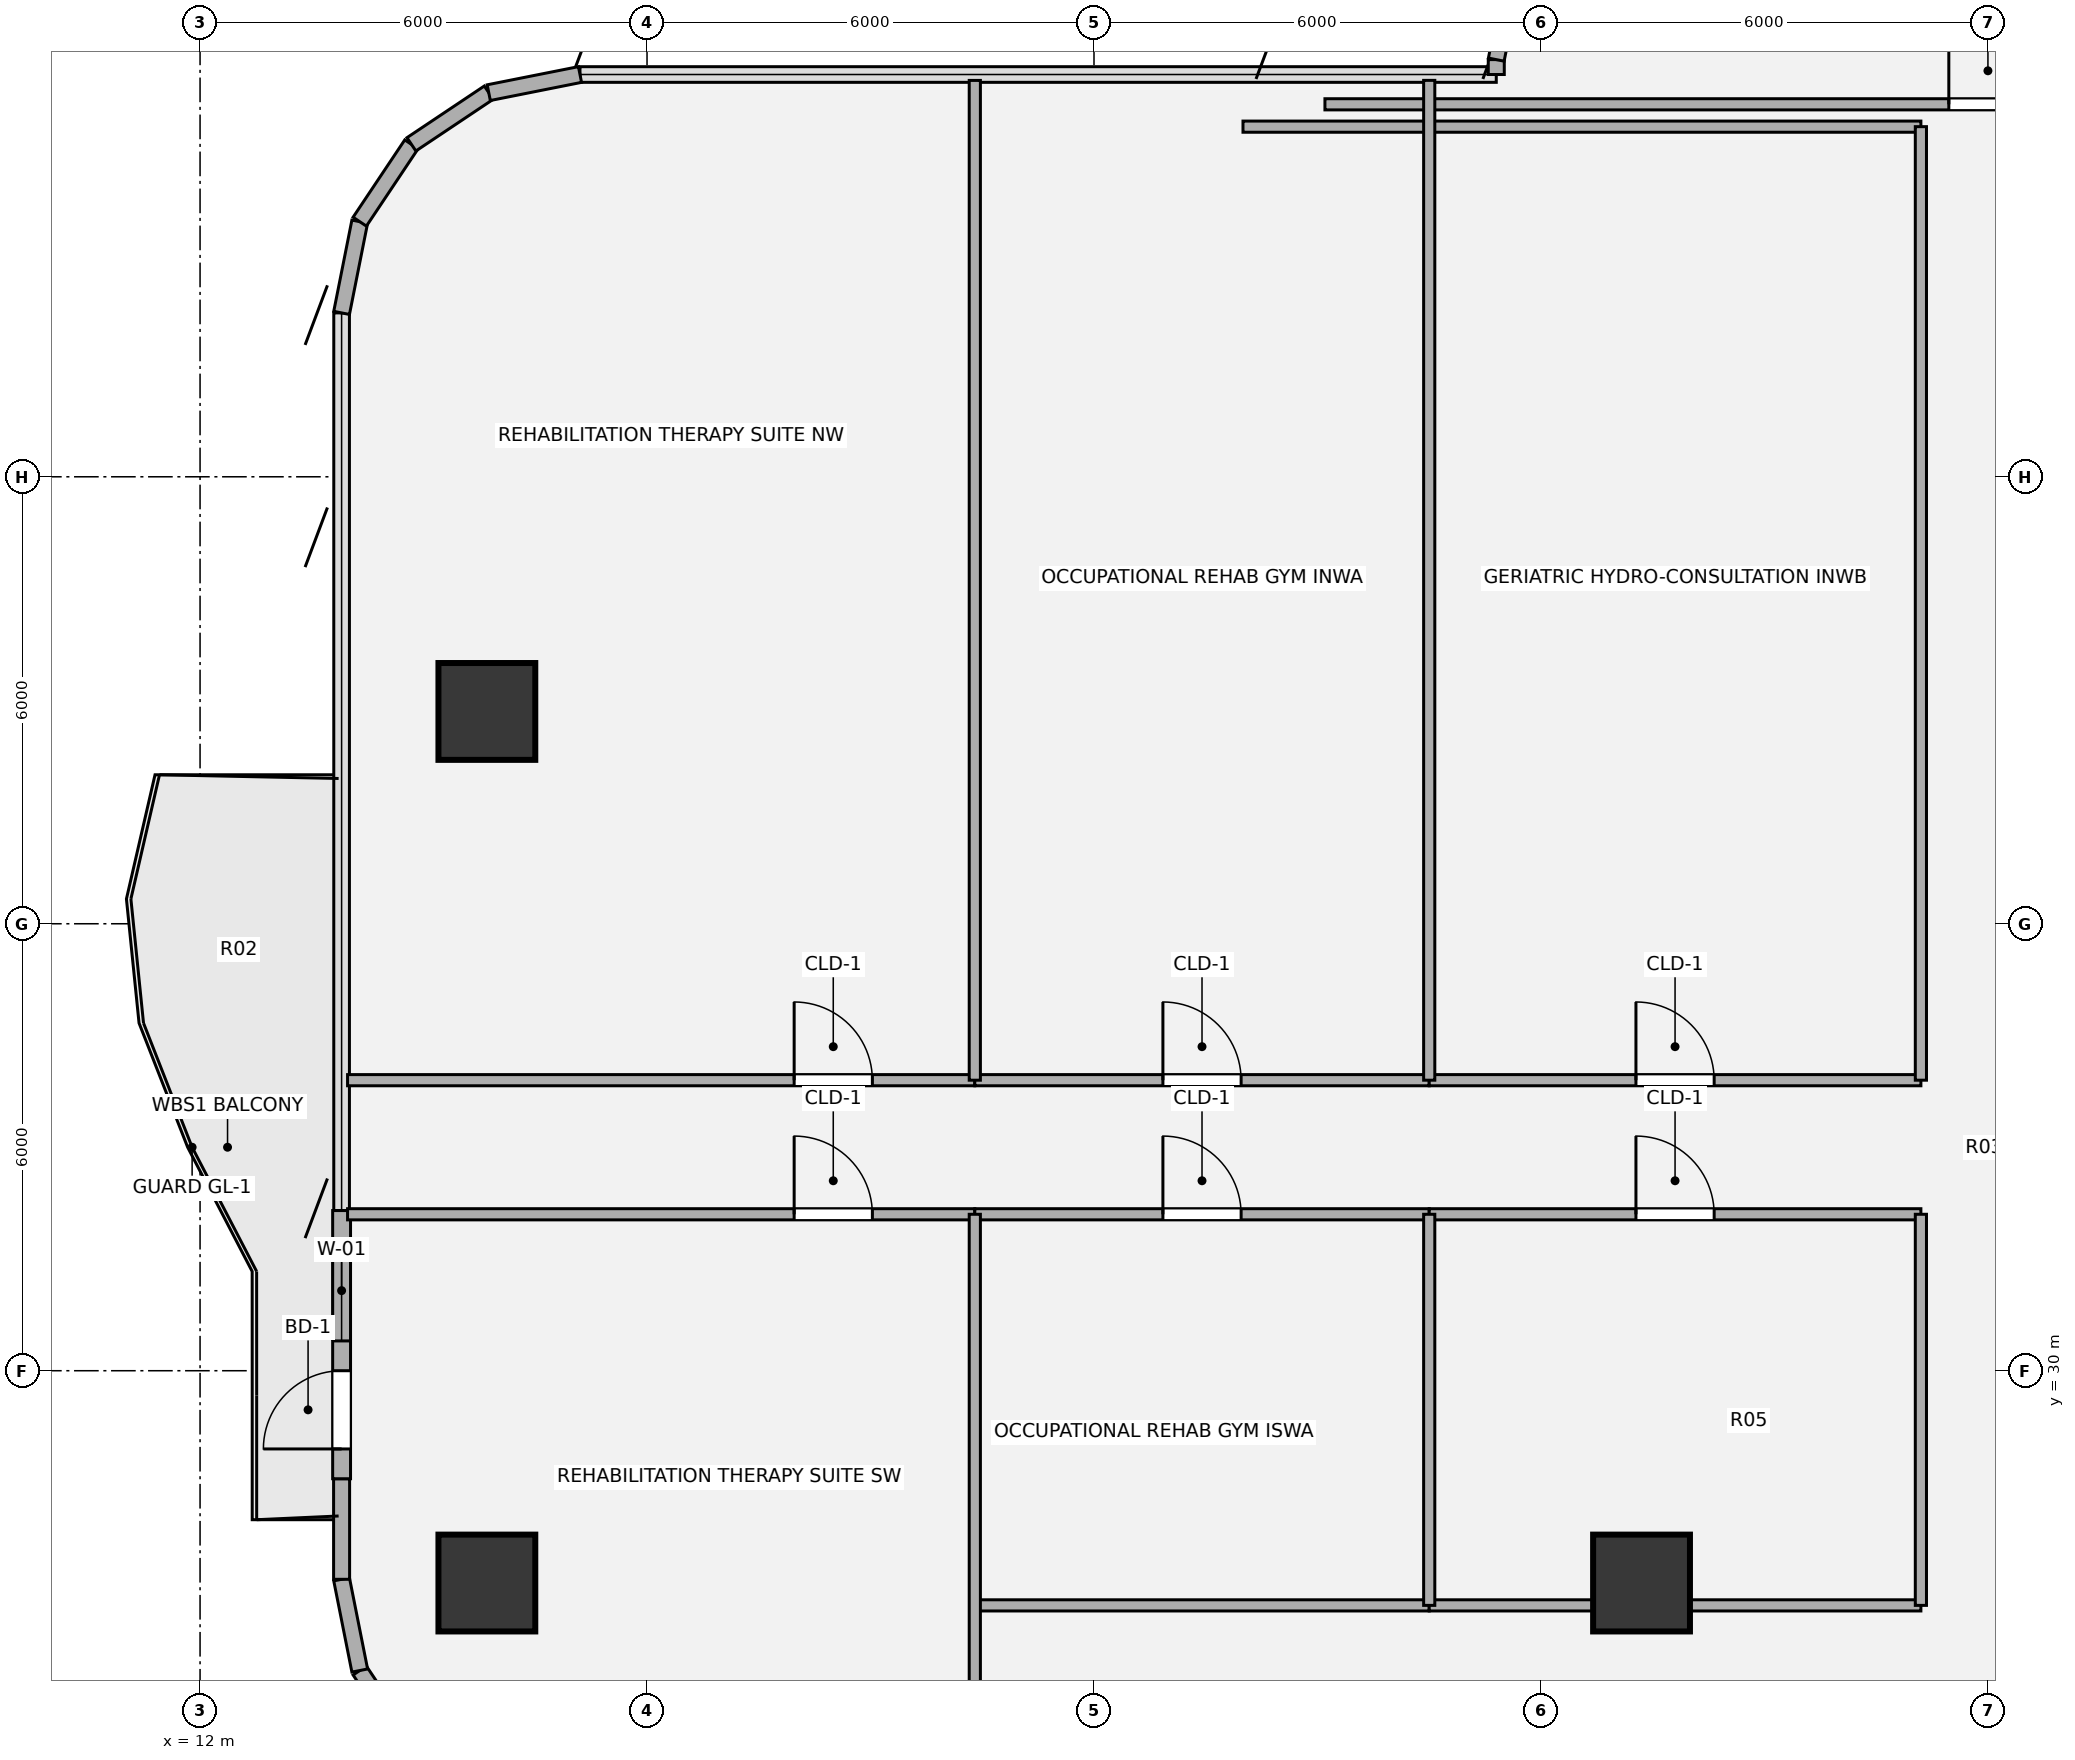
"""IFC4 building model, lengths in metres.
Left out: names, types, materials, properties, quantities, classifications, styles, units other than length and angle.
Written with IfcOpenShell. Run it as: python <this file> out.ifc"""

import sys

from ifc_helpers import new_model, si_unit, direction, frame, frame_2d, origin, origin_2d, place, context, subcontext, project, spatial, rectangle, hollow_circle, extrude, source, transform, mapped, element, fill, save


model = new_model("IFC4")
c1 = context("Model", 3, precision=1e-05, world=origin(), true_north=direction((0.0, 1.0)))
c2 = subcontext(c1, "Body", "Model", "MODEL_VIEW")
j1 = project(units=[si_unit("LENGTHUNIT", "METRE"), si_unit("PLANEANGLEUNIT", "RADIAN")], contexts=[c1])
p1 = place(None, origin())
s1 = spatial("IfcSite", under=j1, at=p1, CompositionType="ELEMENT")
p2 = place(p1, origin())
s2 = spatial("IfcBuilding", under=s1, at=p2, CompositionType="ELEMENT")
p3 = place(p2, frame((0.0, 0.0, 112.5)))
s3 = spatial("IfcBuildingStorey", under=s2, at=p3, CompositionType="ELEMENT", Elevation=112.5)
m1 = source(origin(), c2, "Body", "SweptSolid", [
    extrude(hollow_circle(Radius=0.65, WallThickness=0.045, at=origin_2d()), origin(), (0.0, 0.0, 1.0), 3.78),
])
for number, where, z_axis, x_axis in (
    (1, (15.85, 27.15, 0.0), (0.0, 0.0, 1.0), (1.0, 0.0, 0.0)),
    (2, (15.85, 38.85, 0.0), (0.0, 0.0, 1.0), (1.0, 0.0, 0.0)),
    (3, (31.35, 27.15, 0.0), (0.0, 0.0, 1.0), (1.0, 0.0, 0.0)),
):
    element("IfcColumn", number, at=place(p3, frame(where, z_axis=z_axis, x_axis=x_axis)), inside=s3, PredefinedType="COLUMN", context=c2, shape_type="MappedRepresentation", body=[
        mapped(m1, transform((0.0, 0.0, 0.0), x_axis=(1.0, 0.0, 0.0), y_axis=(0.0, 1.0, 0.0), z_axis=(0.0, 0.0, 1.0), scale=1.0)),
    ])
for number, where, z_axis, x_axis in (
    (4, (14.837, 24.937, 0.0), (0.0, 0.0, 1.0), (-0.556, 0.831, 0.0)),
    (5, (14.144, 25.975, 0.0), (0.0, 0.0, 1.0), (-0.195, 0.981, 0.0)),
):
    element("IfcWall", number, at=place(p3, frame(where, z_axis=z_axis, x_axis=x_axis)), inside=s3, PredefinedType="SOLIDWALL", context=c2, shape_type="SweptSolid", body=[
        extrude(rectangle(XDim=1.249, YDim=0.215, at=frame_2d((0.624, 0.0))), origin(), (0.0, 0.0, 1.0), 3.53),
    ])
p4 = place(p3, frame((13.9, 27.2, 0.0), z_axis=(0.0, 0.0, 1.0), x_axis=(0.0, 1.0, 0.0)))
e6 = element("IfcWall", 6, at=p4, inside=s3, PredefinedType="SOLIDWALL", context=c2, shape_type="SweptSolid", body=[
    extrude(rectangle(XDim=1.35, YDim=0.215, at=frame_2d((0.675, 0.0))), origin(), (0.0, 0.0, 1.0), 3.53),
])
p5 = place(p3, frame((13.9, 28.55, 0.0), z_axis=(0.0, 0.0, 1.0), x_axis=(0.0, 1.0, 0.0)))
e7 = element("IfcWall", 7, at=p5, inside=s3, PredefinedType="SOLIDWALL", context=c2, shape_type="SweptSolid", body=[
    extrude(rectangle(XDim=3.6, YDim=0.24, at=frame_2d((1.8, 0.0))), origin(), (0.0, 0.0, 1.0), 3.53),
])
p6 = place(p5, frame((0.4, 0.0, 0.0)))
e8 = element("IfcOpeningElement", 8, at=p6, cuts=e7, PredefinedType="OPENING", context=c2, shape_type="SweptSolid", body=[
    extrude(rectangle(XDim=1.05, YDim=2.15, at=origin_2d()), frame((0.525, 0.13, 1.075), z_axis=(0.0, -1.0, 0.0), x_axis=(1.0, 0.0, 0.0)), (0.0, 0.0, 1.0), 0.26),
])
p7 = place(p5, frame((1.85, 0.0, 0.85)))
e9 = element("IfcOpeningElement", 9, at=p7, cuts=e7, PredefinedType="OPENING", context=c2, shape_type="SweptSolid", body=[
    extrude(rectangle(XDim=1.35, YDim=1.35, at=origin_2d()), frame((0.675, 0.13, 0.675), z_axis=(0.0, -1.0, 0.0), x_axis=(1.0, 0.0, 0.0)), (0.0, 0.0, 1.0), 0.26),
])
for number, where, z_axis, x_axis in (
    (10, (13.9, 44.2, 0.0), (0.0, 0.0, 1.0), (0.195, 0.981, 0.0)),
    (11, (14.144, 45.425, 0.0), (0.0, 0.0, 1.0), (0.556, 0.831, 0.0)),
    (12, (14.837, 46.463, 0.0), (0.0, 0.0, 1.0), (0.831, 0.556, 0.0)),
    (13, (15.875, 47.156, 0.0), (0.0, 0.0, 1.0), (0.981, 0.195, 0.0)),
):
    element("IfcWall", number, at=place(p3, frame(where, z_axis=z_axis, x_axis=x_axis)), inside=s3, PredefinedType="SOLIDWALL", context=c2, shape_type="SweptSolid", body=[
        extrude(rectangle(XDim=1.249, YDim=0.215, at=frame_2d((0.624, 0.0))), origin(), (0.0, 0.0, 1.0), 3.53),
    ])
p8 = place(p3, frame((29.4, 47.4, 0.0), z_axis=(0.0, 0.0, 1.0), x_axis=(0.0, 1.0, 0.0)))
e14 = element("IfcWall", 14, at=p8, inside=s3, PredefinedType="SOLIDWALL", context=c2, shape_type="SweptSolid", body=[
    extrude(rectangle(XDim=0.2, YDim=0.215, at=frame_2d((0.1, 0.0))), origin(), (0.0, 0.0, 1.0), 3.53),
])
p9 = place(p3, frame((29.4, 47.6, 0.0), z_axis=(0.0, 0.0, 1.0), x_axis=(0.195127417394, 0.980777900945, 0.0)))
e15 = element("IfcWall", 15, at=p9, inside=s3, PredefinedType="SOLIDWALL", context=c2, shape_type="SweptSolid", body=[
    extrude(rectangle(XDim=1.092, YDim=0.215, at=frame_2d((0.546, 0.0))), origin(), (0.0, 0.0, 1.0), 3.53),
])
p10 = place(p3, frame((22.4, 26.85, 0.0), z_axis=(0.0, 0.0, 1.0), x_axis=(1.0, 0.0, 0.0)))
e16 = element("IfcWall", 16, at=p10, inside=s3, PredefinedType="PARTITIONING", context=c2, shape_type="SweptSolid", body=[
    extrude(rectangle(XDim=6.1, YDim=0.15, at=frame_2d((3.05, 0.0))), origin(), (0.0, 0.0, 1.0), 3.055),
])
p11 = place(p3, frame((28.5, 26.85, 0.0), z_axis=(0.0, 0.0, 1.0), x_axis=(1.0, 0.0, 0.0)))
e17 = element("IfcWall", 17, at=p11, inside=s3, PredefinedType="PARTITIONING", context=c2, shape_type="SweptSolid", body=[
    extrude(rectangle(XDim=6.6, YDim=0.15, at=frame_2d((3.3, 0.0))), origin(), (0.0, 0.0, 1.0), 2.903),
])
p12 = place(p3, frame((13.98, 32.1, 0.0), z_axis=(0.0, 0.0, 1.0), x_axis=(1.0, 0.0, 0.0)))
e18 = element("IfcWall", 18, at=p12, inside=s3, PredefinedType="PARTITIONING", context=c2, shape_type="SweptSolid", body=[
    extrude(rectangle(XDim=8.42, YDim=0.15, at=frame_2d((4.21, 0.0))), origin(), (0.0, 0.0, 1.0), 2.982),
])
p13 = place(p12, frame((5.995, 0.0, 0.0)))
e19 = element("IfcOpeningElement", 19, at=p13, cuts=e18, PredefinedType="OPENING", context=c2, shape_type="SweptSolid", body=[
    extrude(rectangle(XDim=1.05, YDim=2.1, at=origin_2d()), frame((0.525, 0.085, 1.05), z_axis=(0.0, -1.0, 0.0), x_axis=(1.0, 0.0, 0.0)), (0.0, 0.0, 1.0), 0.17),
])
p14 = place(p3, frame((22.4, 32.1, 0.0), z_axis=(0.0, 0.0, 1.0), x_axis=(1.0, 0.0, 0.0)))
e20 = element("IfcWall", 20, at=p14, inside=s3, PredefinedType="PARTITIONING", context=c2, shape_type="SweptSolid", body=[
    extrude(rectangle(XDim=6.1, YDim=0.15, at=frame_2d((3.05, 0.0))), origin(), (0.0, 0.0, 1.0), 2.982),
])
p15 = place(p14, frame((2.525, 0.0, 0.0)))
e21 = element("IfcOpeningElement", 21, at=p15, cuts=e20, PredefinedType="OPENING", context=c2, shape_type="SweptSolid", body=[
    extrude(rectangle(XDim=1.05, YDim=2.1, at=origin_2d()), frame((0.525, 0.085, 1.05), z_axis=(0.0, -1.0, 0.0), x_axis=(1.0, 0.0, 0.0)), (0.0, 0.0, 1.0), 0.17),
])
p16 = place(p3, frame((28.5, 32.1, 0.0), z_axis=(0.0, 0.0, 1.0), x_axis=(1.0, 0.0, 0.0)))
e22 = element("IfcWall", 22, at=p16, inside=s3, PredefinedType="PARTITIONING", context=c2, shape_type="SweptSolid", body=[
    extrude(rectangle(XDim=6.6, YDim=0.15, at=frame_2d((3.3, 0.0))), origin(), (0.0, 0.0, 1.0), 2.982),
])
p17 = place(p16, frame((2.775, 0.0, 0.0)))
e23 = element("IfcOpeningElement", 23, at=p17, cuts=e22, PredefinedType="OPENING", context=c2, shape_type="SweptSolid", body=[
    extrude(rectangle(XDim=1.05, YDim=2.1, at=origin_2d()), frame((0.525, 0.085, 1.05), z_axis=(0.0, -1.0, 0.0), x_axis=(1.0, 0.0, 0.0)), (0.0, 0.0, 1.0), 0.17),
])
p18 = place(p3, frame((13.98, 33.9, 0.0), z_axis=(0.0, 0.0, 1.0), x_axis=(1.0, 0.0, 0.0)))
e24 = element("IfcWall", 24, at=p18, inside=s3, PredefinedType="PARTITIONING", context=c2, shape_type="SweptSolid", body=[
    extrude(rectangle(XDim=8.42, YDim=0.15, at=frame_2d((4.21, 0.0))), origin(), (0.0, 0.0, 1.0), 2.982),
])
p19 = place(p18, frame((5.995, 0.0, 0.0)))
e25 = element("IfcOpeningElement", 25, at=p19, cuts=e24, PredefinedType="OPENING", context=c2, shape_type="SweptSolid", body=[
    extrude(rectangle(XDim=1.05, YDim=2.1, at=origin_2d()), frame((0.525, 0.085, 1.05), z_axis=(0.0, -1.0, 0.0), x_axis=(1.0, 0.0, 0.0)), (0.0, 0.0, 1.0), 0.17),
])
p20 = place(p3, frame((22.4, 33.9, 0.0), z_axis=(0.0, 0.0, 1.0), x_axis=(1.0, 0.0, 0.0)))
e26 = element("IfcWall", 26, at=p20, inside=s3, PredefinedType="PARTITIONING", context=c2, shape_type="SweptSolid", body=[
    extrude(rectangle(XDim=6.1, YDim=0.15, at=frame_2d((3.05, 0.0))), origin(), (0.0, 0.0, 1.0), 2.982),
])
p21 = place(p20, frame((2.525, 0.0, 0.0)))
e27 = element("IfcOpeningElement", 27, at=p21, cuts=e26, PredefinedType="OPENING", context=c2, shape_type="SweptSolid", body=[
    extrude(rectangle(XDim=1.05, YDim=2.1, at=origin_2d()), frame((0.525, 0.085, 1.05), z_axis=(0.0, -1.0, 0.0), x_axis=(1.0, 0.0, 0.0)), (0.0, 0.0, 1.0), 0.17),
])
p22 = place(p3, frame((28.5, 33.9, 0.0), z_axis=(0.0, 0.0, 1.0), x_axis=(1.0, 0.0, 0.0)))
e28 = element("IfcWall", 28, at=p22, inside=s3, PredefinedType="PARTITIONING", context=c2, shape_type="SweptSolid", body=[
    extrude(rectangle(XDim=6.6, YDim=0.15, at=frame_2d((3.3, 0.0))), origin(), (0.0, 0.0, 1.0), 2.982),
])
p23 = place(p22, frame((2.775, 0.0, 0.0)))
e29 = element("IfcOpeningElement", 29, at=p23, cuts=e28, PredefinedType="OPENING", context=c2, shape_type="SweptSolid", body=[
    extrude(rectangle(XDim=1.05, YDim=2.1, at=origin_2d()), frame((0.525, 0.085, 1.05), z_axis=(0.0, -1.0, 0.0), x_axis=(1.0, 0.0, 0.0)), (0.0, 0.0, 1.0), 0.17),
])
p24 = place(p3, frame((26.0, 46.7, 0.0), z_axis=(0.0, 0.0, 1.0), x_axis=(1.0, 0.0, 0.0)))
e30 = element("IfcWall", 30, at=p24, inside=s3, PredefinedType="PARTITIONING", context=c2, shape_type="SweptSolid", body=[
    extrude(rectangle(XDim=9.1, YDim=0.15, at=frame_2d((4.55, 0.0))), origin(), (0.0, 0.0, 1.0), 3.308),
])
p25 = place(p3, frame((27.1, 47.0, 0.0), z_axis=(0.0, 0.0, 1.0), x_axis=(1.0, 0.0, 0.0)))
e31 = element("IfcWall", 31, at=p25, inside=s3, PredefinedType="PARTITIONING", context=c2, shape_type="SweptSolid", body=[
    extrude(rectangle(XDim=17.8, YDim=0.15, at=frame_2d((8.9, 0.0))), origin(), (0.0, 0.0, 1.0), 3.308),
])
p26 = place(p25, frame((8.375, 0.0, 0.0)))
e32 = element("IfcOpeningElement", 32, at=p26, cuts=e31, PredefinedType="OPENING", context=c2, shape_type="SweptSolid", body=[
    extrude(rectangle(XDim=1.05, YDim=2.1, at=origin_2d()), frame((0.525, 0.085, 1.05), z_axis=(0.0, -1.0, 0.0), x_axis=(1.0, 0.0, 0.0)), (0.0, 0.0, 1.0), 0.17),
])
p27 = place(p3, frame((22.4, 25.4, 0.0), z_axis=(0.0, 0.0, 1.0), x_axis=(0.0, 1.0, 0.0)))
e33 = element("IfcWall", 33, at=p27, inside=s3, PredefinedType="PARTITIONING", context=c2, shape_type="SweptSolid", body=[
    extrude(rectangle(XDim=6.7, YDim=0.15, at=frame_2d((3.35, 0.0))), origin(), (0.0, 0.0, 1.0), 3.5),
])
p28 = place(p3, frame((22.4, 33.9, 0.0), z_axis=(0.0, 0.0, 1.0), x_axis=(0.0, 1.0, 0.0)))
e34 = element("IfcWall", 34, at=p28, inside=s3, PredefinedType="PARTITIONING", context=c2, shape_type="SweptSolid", body=[
    extrude(rectangle(XDim=13.421, YDim=0.15, at=frame_2d((6.71, 0.0))), origin(), (0.0, 0.0, 1.0), 3.5),
])
p29 = place(p3, frame((28.5, 26.85, 0.0), z_axis=(0.0, 0.0, 1.0), x_axis=(0.0, 1.0, 0.0)))
e35 = element("IfcWall", 35, at=p29, inside=s3, PredefinedType="PARTITIONING", context=c2, shape_type="SweptSolid", body=[
    extrude(rectangle(XDim=5.25, YDim=0.15, at=frame_2d((2.625, 0.0))), origin(), (0.0, 0.0, 1.0), 3.5),
])
p30 = place(p3, frame((28.5, 33.9, 0.0), z_axis=(0.0, 0.0, 1.0), x_axis=(0.0, 1.0, 0.0)))
e36 = element("IfcWall", 36, at=p30, inside=s3, PredefinedType="PARTITIONING", context=c2, shape_type="SweptSolid", body=[
    extrude(rectangle(XDim=13.421, YDim=0.15, at=frame_2d((6.711, 0.0))), origin(), (0.0, 0.0, 1.0), 3.5),
])
p31 = place(p3, frame((35.1, 26.85, 0.0), z_axis=(0.0, 0.0, 1.0), x_axis=(0.0, 1.0, 0.0)))
e37 = element("IfcWall", 37, at=p31, inside=s3, PredefinedType="PARTITIONING", context=c2, shape_type="SweptSolid", body=[
    extrude(rectangle(XDim=5.25, YDim=0.15, at=frame_2d((2.625, 0.0))), origin(), (0.0, 0.0, 1.0), 3.5),
])
p32 = place(p3, frame((35.1, 33.9, 0.0), z_axis=(0.0, 0.0, 1.0), x_axis=(0.0, 1.0, 0.0)))
e38 = element("IfcWall", 38, at=p32, inside=s3, PredefinedType="PARTITIONING", context=c2, shape_type="SweptSolid", body=[
    extrude(rectangle(XDim=12.8, YDim=0.15, at=frame_2d((6.4, 0.0))), origin(), (0.0, 0.0, 1.0), 3.5),
])
m2 = source(origin(), c2, "Body", "SweptSolid", [
    extrude(rectangle(XDim=1.05, YDim=2.15, at=origin_2d()), frame((0.525, 0.025, 1.075), z_axis=(0.0, -1.0, 0.0), x_axis=(1.0, 0.0, 0.0)), (0.0, 0.0, 1.0), 0.05),
])
p33 = place(p6, origin())
e39 = element("IfcDoor", 39, at=p33, inside=s3, OperationType="SINGLE_SWING_LEFT", PredefinedType="DOOR", context=c2, shape_type="MappedRepresentation", body=[
    mapped(m2, transform((0.0, 0.0, 0.0), x_axis=(1.0, 0.0, 0.0), y_axis=(0.0, 1.0, 0.0), z_axis=(0.0, 0.0, 1.0), scale=1.0)),
])
fill(e8, e39)
m3 = source(origin(), c2, "Body", "SweptSolid", [
    extrude(rectangle(XDim=1.35, YDim=1.35, at=origin_2d()), frame((0.675, 0.03, 0.675), z_axis=(0.0, -1.0, 0.0), x_axis=(1.0, 0.0, 0.0)), (0.0, 0.0, 1.0), 0.06),
])
p34 = place(p7, origin())
e40 = element("IfcWindow", 40, at=p34, inside=s3, PartitioningType="SINGLE_PANEL", PredefinedType="WINDOW", context=c2, shape_type="MappedRepresentation", body=[
    mapped(m3, transform((0.0, 0.0, 0.0), x_axis=(1.0, 0.0, 0.0), y_axis=(0.0, 1.0, 0.0), z_axis=(0.0, 0.0, 1.0), scale=1.0)),
])
fill(e9, e40)
m4 = source(origin(), c2, "Body", "SweptSolid", [
    extrude(rectangle(XDim=1.05, YDim=2.1, at=origin_2d()), frame((0.525, 0.025, 1.05), z_axis=(0.0, -1.0, 0.0), x_axis=(1.0, 0.0, 0.0)), (0.0, 0.0, 1.0), 0.05),
])
p35 = place(p13, origin())
e41 = element("IfcDoor", 41, at=p35, inside=s3, OperationType="SINGLE_SWING_LEFT", PredefinedType="DOOR", context=c2, shape_type="MappedRepresentation", body=[
    mapped(m4, transform((0.0, 0.0, 0.0), x_axis=(1.0, 0.0, 0.0), y_axis=(0.0, 1.0, 0.0), z_axis=(0.0, 0.0, 1.0), scale=1.0)),
])
fill(e19, e41)
p36 = place(p15, origin())
e42 = element("IfcDoor", 42, at=p36, inside=s3, OperationType="SINGLE_SWING_LEFT", PredefinedType="DOOR", context=c2, shape_type="MappedRepresentation", body=[
    mapped(m4, transform((0.0, 0.0, 0.0), x_axis=(1.0, 0.0, 0.0), y_axis=(0.0, 1.0, 0.0), z_axis=(0.0, 0.0, 1.0), scale=1.0)),
])
fill(e21, e42)
p37 = place(p17, origin())
e43 = element("IfcDoor", 43, at=p37, inside=s3, OperationType="SINGLE_SWING_LEFT", PredefinedType="DOOR", context=c2, shape_type="MappedRepresentation", body=[
    mapped(m4, transform((0.0, 0.0, 0.0), x_axis=(1.0, 0.0, 0.0), y_axis=(0.0, 1.0, 0.0), z_axis=(0.0, 0.0, 1.0), scale=1.0)),
])
fill(e23, e43)
p38 = place(p19, origin())
e44 = element("IfcDoor", 44, at=p38, inside=s3, OperationType="SINGLE_SWING_LEFT", PredefinedType="DOOR", context=c2, shape_type="MappedRepresentation", body=[
    mapped(m4, transform((0.0, 0.0, 0.0), x_axis=(1.0, 0.0, 0.0), y_axis=(0.0, 1.0, 0.0), z_axis=(0.0, 0.0, 1.0), scale=1.0)),
])
fill(e25, e44)
p39 = place(p21, origin())
e45 = element("IfcDoor", 45, at=p39, inside=s3, OperationType="SINGLE_SWING_LEFT", PredefinedType="DOOR", context=c2, shape_type="MappedRepresentation", body=[
    mapped(m4, transform((0.0, 0.0, 0.0), x_axis=(1.0, 0.0, 0.0), y_axis=(0.0, 1.0, 0.0), z_axis=(0.0, 0.0, 1.0), scale=1.0)),
])
fill(e27, e45)
p40 = place(p23, origin())
e46 = element("IfcDoor", 46, at=p40, inside=s3, OperationType="SINGLE_SWING_LEFT", PredefinedType="DOOR", context=c2, shape_type="MappedRepresentation", body=[
    mapped(m4, transform((0.0, 0.0, 0.0), x_axis=(1.0, 0.0, 0.0), y_axis=(0.0, 1.0, 0.0), z_axis=(0.0, 0.0, 1.0), scale=1.0)),
])
fill(e29, e46)
p41 = place(p26, origin())
e47 = element("IfcDoor", 47, at=p41, inside=s3, OperationType="SINGLE_SWING_LEFT", PredefinedType="DOOR", context=c2, shape_type="MappedRepresentation", body=[
    mapped(m4, transform((0.0, 0.0, 0.0), x_axis=(1.0, 0.0, 0.0), y_axis=(0.0, 1.0, 0.0), z_axis=(0.0, 0.0, 1.0), scale=1.0)),
])
fill(e32, e47)
save(model, sys.argv[1])
